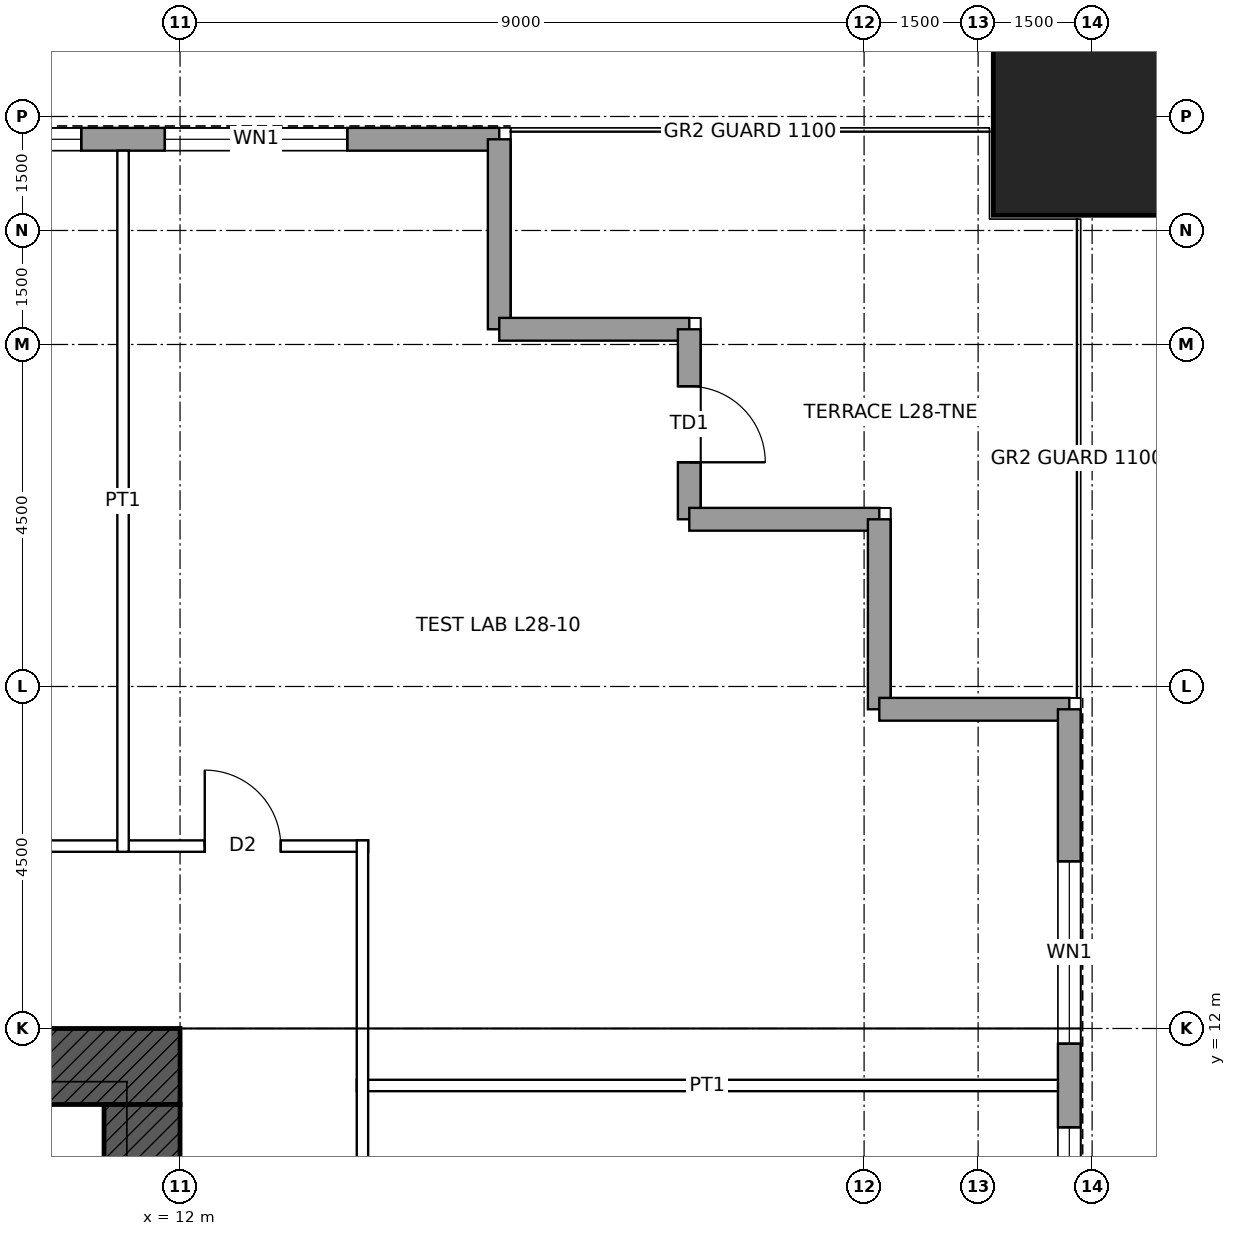
"""IFC4 building model, lengths in metres.
Left out: names, types, materials, properties, quantities, classifications, styles, units other than length and angle.
Written with IfcOpenShell. Run it as: python <this file> out.ifc"""

import sys

from ifc_helpers import new_model, si_unit, direction, frame, frame_2d, origin, origin_2d, place, context, subcontext, project, spatial, rectangle, hollow_rectangle, extrude, element, fill, save


model = new_model("IFC4")
c1 = context("Model", 3, precision=1e-05, world=origin(), true_north=direction((0.0, 1.0)))
c2 = subcontext(c1, "Body", "Model", "MODEL_VIEW")
j1 = project(units=[si_unit("LENGTHUNIT", "METRE"), si_unit("PLANEANGLEUNIT", "RADIAN")], contexts=[c1])
p1 = place(None, origin())
s1 = spatial("IfcSite", under=j1, at=p1, CompositionType="ELEMENT")
p2 = place(p1, origin())
s2 = spatial("IfcBuilding", under=s1, at=p2, CompositionType="ELEMENT")
p3 = place(p2, frame((0.0, 0.0, 140.4)))
s3 = spatial("IfcBuildingStorey", under=s2, at=p3, CompositionType="ELEMENT", Elevation=140.4)
p4 = place(p3, frame((24.0, 24.0, 0.0), z_axis=(0.0, 0.0, 1.0), x_axis=(1.0, 0.0, 0.0)))
e1 = element("IfcColumn", 1, at=p4, inside=s3, PredefinedType="COLUMN", context=c2, shape_type="SweptSolid", body=[
    extrude(hollow_rectangle(XDim=2.6, YDim=2.6, WallThickness=0.13, at=origin_2d()), origin(), (0.0, 0.0, 1.0), 4.5),
])
p5 = place(p3, frame((-12.0, 11.5, 0.0), z_axis=(0.0, 0.0, 1.0), x_axis=(1.0, 0.0, 0.0)))
e2 = element("IfcWall", 2, at=p5, inside=s3, PredefinedType="SHEAR", context=c2, shape_type="SweptSolid", body=[
    extrude(rectangle(XDim=24.0, YDim=1.0, at=frame_2d((12.0, 0.0))), origin(), (0.0, 0.0, 1.0), 4.5),
])
p6 = place(p5, frame((6.25, 0.0, 0.0)))
e3 = element("IfcOpeningElement", 3, at=p6, cuts=e2, PredefinedType="OPENING", context=c2, shape_type="SweptSolid", body=[
    extrude(rectangle(XDim=1.0, YDim=2.4, at=frame_2d((0.5, 1.2))), frame((0.0, 0.51, 0.0), z_axis=(0.0, -1.0, 0.0), x_axis=(1.0, 0.0, 0.0)), (0.0, 0.0, 1.0), 1.02),
])
p7 = place(p5, frame((16.75, 0.0, 0.0)))
e4 = element("IfcOpeningElement", 4, at=p7, cuts=e2, PredefinedType="OPENING", context=c2, shape_type="SweptSolid", body=[
    extrude(rectangle(XDim=1.0, YDim=2.4, at=frame_2d((0.5, 1.2))), frame((0.0, 0.51, 0.0), z_axis=(0.0, -1.0, 0.0), x_axis=(1.0, 0.0, 0.0)), (0.0, 0.0, 1.0), 1.02),
])
p8 = place(p3, frame((11.5, 11.0, 0.0), z_axis=(0.0, 0.0, 1.0), x_axis=(0.0, -1.0, 0.0)))
e5 = element("IfcWall", 5, at=p8, inside=s3, PredefinedType="SHEAR", context=c2, shape_type="SweptSolid", body=[
    extrude(rectangle(XDim=22.0, YDim=1.0, at=frame_2d((11.0, 0.0))), origin(), (0.0, 0.0, 1.0), 4.5),
])
p9 = place(p8, frame((10.5, 0.0, 0.0)))
e6 = element("IfcOpeningElement", 6, at=p9, cuts=e5, PredefinedType="OPENING", context=c2, shape_type="SweptSolid", body=[
    extrude(rectangle(XDim=1.0, YDim=2.4, at=frame_2d((0.5, 1.2))), frame((0.0, 0.51, 0.0), z_axis=(0.0, -1.0, 0.0), x_axis=(1.0, 0.0, 0.0)), (0.0, 0.0, 1.0), 1.02),
])
p10 = place(p3, frame((-16.2, 23.7, 0.0), z_axis=(0.0, 0.0, 1.0), x_axis=(1.0, 0.0, 0.0)))
e7 = element("IfcWall", 7, at=p10, inside=s3, PredefinedType="SOLIDWALL", context=c2, shape_type="SweptSolid", body=[
    extrude(rectangle(XDim=32.4, YDim=0.3, at=frame_2d((16.2, 0.0))), origin(), (0.0, 0.0, 1.0), 4.3),
])
p11 = place(p10, frame((2.0, 0.0, 1.0)))
e8 = element("IfcOpeningElement", 8, at=p11, cuts=e7, PredefinedType="OPENING", context=c2, shape_type="SweptSolid", body=[
    extrude(rectangle(XDim=2.4, YDim=1.2, at=frame_2d((1.2, 0.6))), frame((0.0, 0.16, 0.0), z_axis=(0.0, -1.0, 0.0), x_axis=(1.0, 0.0, 0.0)), (0.0, 0.0, 1.0), 0.32),
])
p12 = place(p10, frame((5.5, 0.0, 1.0)))
e9 = element("IfcOpeningElement", 9, at=p12, cuts=e7, PredefinedType="OPENING", context=c2, shape_type="SweptSolid", body=[
    extrude(rectangle(XDim=2.4, YDim=1.2, at=frame_2d((1.2, 0.6))), frame((0.0, 0.16, 0.0), z_axis=(0.0, -1.0, 0.0), x_axis=(1.0, 0.0, 0.0)), (0.0, 0.0, 1.0), 0.32),
])
p13 = place(p10, frame((9.5, 0.0, 1.0)))
e10 = element("IfcOpeningElement", 10, at=p13, cuts=e7, PredefinedType="OPENING", context=c2, shape_type="SweptSolid", body=[
    extrude(rectangle(XDim=2.4, YDim=1.2, at=frame_2d((1.2, 0.6))), frame((0.0, 0.16, 0.0), z_axis=(0.0, -1.0, 0.0), x_axis=(1.0, 0.0, 0.0)), (0.0, 0.0, 1.0), 0.32),
])
p14 = place(p10, frame((13.0, 0.0, 1.0)))
e11 = element("IfcOpeningElement", 11, at=p14, cuts=e7, PredefinedType="OPENING", context=c2, shape_type="SweptSolid", body=[
    extrude(rectangle(XDim=2.4, YDim=1.2, at=frame_2d((1.2, 0.6))), frame((0.0, 0.16, 0.0), z_axis=(0.0, -1.0, 0.0), x_axis=(1.0, 0.0, 0.0)), (0.0, 0.0, 1.0), 0.32),
])
p15 = place(p10, frame((17.0, 0.0, 1.0)))
e12 = element("IfcOpeningElement", 12, at=p15, cuts=e7, PredefinedType="OPENING", context=c2, shape_type="SweptSolid", body=[
    extrude(rectangle(XDim=2.4, YDim=1.2, at=frame_2d((1.2, 0.6))), frame((0.0, 0.16, 0.0), z_axis=(0.0, -1.0, 0.0), x_axis=(1.0, 0.0, 0.0)), (0.0, 0.0, 1.0), 0.32),
])
p16 = place(p10, frame((20.5, 0.0, 1.0)))
e13 = element("IfcOpeningElement", 13, at=p16, cuts=e7, PredefinedType="OPENING", context=c2, shape_type="SweptSolid", body=[
    extrude(rectangle(XDim=2.4, YDim=1.2, at=frame_2d((1.2, 0.6))), frame((0.0, 0.16, 0.0), z_axis=(0.0, -1.0, 0.0), x_axis=(1.0, 0.0, 0.0)), (0.0, 0.0, 1.0), 0.32),
])
p17 = place(p10, frame((24.5, 0.0, 1.0)))
e14 = element("IfcOpeningElement", 14, at=p17, cuts=e7, PredefinedType="OPENING", context=c2, shape_type="SweptSolid", body=[
    extrude(rectangle(XDim=2.4, YDim=1.2, at=frame_2d((1.2, 0.6))), frame((0.0, 0.16, 0.0), z_axis=(0.0, -1.0, 0.0), x_axis=(1.0, 0.0, 0.0)), (0.0, 0.0, 1.0), 0.32),
])
p18 = place(p10, frame((28.0, 0.0, 1.0)))
e15 = element("IfcOpeningElement", 15, at=p18, cuts=e7, PredefinedType="OPENING", context=c2, shape_type="SweptSolid", body=[
    extrude(rectangle(XDim=2.4, YDim=1.2, at=frame_2d((1.2, 0.6))), frame((0.0, 0.16, 0.0), z_axis=(0.0, -1.0, 0.0), x_axis=(1.0, 0.0, 0.0)), (0.0, 0.0, 1.0), 0.32),
])
for number, where, z_axis, x_axis in (
    (16, (16.2, 23.7, 0.0), (0.0, 0.0, 1.0), (0.0, -1.0, 0.0)),
    (17, (16.2, 21.2, 0.0), (0.0, 0.0, 1.0), (1.0, 0.0, 0.0)),
):
    element("IfcWall", number, at=place(p3, frame(where, z_axis=z_axis, x_axis=x_axis)), inside=s3, PredefinedType="SOLIDWALL", context=c2, shape_type="SweptSolid", body=[
        extrude(rectangle(XDim=2.5, YDim=0.3, at=frame_2d((1.25, 0.0))), origin(), (0.0, 0.0, 1.0), 4.3),
    ])
p19 = place(p3, frame((18.7, 21.2, 0.0), z_axis=(0.0, 0.0, 1.0), x_axis=(0.0, -1.0, 0.0)))
e18 = element("IfcWall", 18, at=p19, inside=s3, PredefinedType="SOLIDWALL", context=c2, shape_type="SweptSolid", body=[
    extrude(rectangle(XDim=2.5, YDim=0.3, at=frame_2d((1.25, 0.0))), origin(), (0.0, 0.0, 1.0), 4.3),
])
p20 = place(p19, frame((0.75, 0.0, 0.0)))
e19 = element("IfcOpeningElement", 19, at=p20, cuts=e18, PredefinedType="OPENING", context=c2, shape_type="SweptSolid", body=[
    extrude(rectangle(XDim=1.0, YDim=2.4, at=frame_2d((0.5, 1.2))), frame((0.0, 0.16, 0.0), z_axis=(0.0, -1.0, 0.0), x_axis=(1.0, 0.0, 0.0)), (0.0, 0.0, 1.0), 0.32),
])
for number, where, z_axis, x_axis in (
    (20, (18.7, 18.7, 0.0), (0.0, 0.0, 1.0), (1.0, 0.0, 0.0)),
    (21, (21.2, 18.7, 0.0), (0.0, 0.0, 1.0), (0.0, -1.0, 0.0)),
    (22, (21.2, 16.2, 0.0), (0.0, 0.0, 1.0), (1.0, 0.0, 0.0)),
):
    element("IfcWall", number, at=place(p3, frame(where, z_axis=z_axis, x_axis=x_axis)), inside=s3, PredefinedType="SOLIDWALL", context=c2, shape_type="SweptSolid", body=[
        extrude(rectangle(XDim=2.5, YDim=0.3, at=frame_2d((1.25, 0.0))), origin(), (0.0, 0.0, 1.0), 4.3),
    ])
p21 = place(p3, frame((23.7, 16.2, 0.0), z_axis=(0.0, 0.0, 1.0), x_axis=(0.0, -1.0, 0.0)))
e23 = element("IfcWall", 23, at=p21, inside=s3, PredefinedType="SOLIDWALL", context=c2, shape_type="SweptSolid", body=[
    extrude(rectangle(XDim=32.4, YDim=0.3, at=frame_2d((16.2, 0.0))), origin(), (0.0, 0.0, 1.0), 4.3),
])
p22 = place(p21, frame((2.0, 0.0, 1.0)))
e24 = element("IfcOpeningElement", 24, at=p22, cuts=e23, PredefinedType="OPENING", context=c2, shape_type="SweptSolid", body=[
    extrude(rectangle(XDim=2.4, YDim=1.2, at=frame_2d((1.2, 0.6))), frame((0.0, 0.16, 0.0), z_axis=(0.0, -1.0, 0.0), x_axis=(1.0, 0.0, 0.0)), (0.0, 0.0, 1.0), 0.32),
])
p23 = place(p21, frame((5.5, 0.0, 1.0)))
e25 = element("IfcOpeningElement", 25, at=p23, cuts=e23, PredefinedType="OPENING", context=c2, shape_type="SweptSolid", body=[
    extrude(rectangle(XDim=2.4, YDim=1.2, at=frame_2d((1.2, 0.6))), frame((0.0, 0.16, 0.0), z_axis=(0.0, -1.0, 0.0), x_axis=(1.0, 0.0, 0.0)), (0.0, 0.0, 1.0), 0.32),
])
p24 = place(p21, frame((9.5, 0.0, 1.0)))
e26 = element("IfcOpeningElement", 26, at=p24, cuts=e23, PredefinedType="OPENING", context=c2, shape_type="SweptSolid", body=[
    extrude(rectangle(XDim=2.4, YDim=1.2, at=frame_2d((1.2, 0.6))), frame((0.0, 0.16, 0.0), z_axis=(0.0, -1.0, 0.0), x_axis=(1.0, 0.0, 0.0)), (0.0, 0.0, 1.0), 0.32),
])
p25 = place(p21, frame((13.0, 0.0, 1.0)))
e27 = element("IfcOpeningElement", 27, at=p25, cuts=e23, PredefinedType="OPENING", context=c2, shape_type="SweptSolid", body=[
    extrude(rectangle(XDim=2.4, YDim=1.2, at=frame_2d((1.2, 0.6))), frame((0.0, 0.16, 0.0), z_axis=(0.0, -1.0, 0.0), x_axis=(1.0, 0.0, 0.0)), (0.0, 0.0, 1.0), 0.32),
])
p26 = place(p21, frame((17.0, 0.0, 1.0)))
e28 = element("IfcOpeningElement", 28, at=p26, cuts=e23, PredefinedType="OPENING", context=c2, shape_type="SweptSolid", body=[
    extrude(rectangle(XDim=2.4, YDim=1.2, at=frame_2d((1.2, 0.6))), frame((0.0, 0.16, 0.0), z_axis=(0.0, -1.0, 0.0), x_axis=(1.0, 0.0, 0.0)), (0.0, 0.0, 1.0), 0.32),
])
p27 = place(p21, frame((20.5, 0.0, 1.0)))
e29 = element("IfcOpeningElement", 29, at=p27, cuts=e23, PredefinedType="OPENING", context=c2, shape_type="SweptSolid", body=[
    extrude(rectangle(XDim=2.4, YDim=1.2, at=frame_2d((1.2, 0.6))), frame((0.0, 0.16, 0.0), z_axis=(0.0, -1.0, 0.0), x_axis=(1.0, 0.0, 0.0)), (0.0, 0.0, 1.0), 0.32),
])
p28 = place(p21, frame((24.5, 0.0, 1.0)))
e30 = element("IfcOpeningElement", 30, at=p28, cuts=e23, PredefinedType="OPENING", context=c2, shape_type="SweptSolid", body=[
    extrude(rectangle(XDim=2.4, YDim=1.2, at=frame_2d((1.2, 0.6))), frame((0.0, 0.16, 0.0), z_axis=(0.0, -1.0, 0.0), x_axis=(1.0, 0.0, 0.0)), (0.0, 0.0, 1.0), 0.32),
])
p29 = place(p21, frame((28.0, 0.0, 1.0)))
e31 = element("IfcOpeningElement", 31, at=p29, cuts=e23, PredefinedType="OPENING", context=c2, shape_type="SweptSolid", body=[
    extrude(rectangle(XDim=2.4, YDim=1.2, at=frame_2d((1.2, 0.6))), frame((0.0, 0.16, 0.0), z_axis=(0.0, -1.0, 0.0), x_axis=(1.0, 0.0, 0.0)), (0.0, 0.0, 1.0), 0.32),
])
p30 = place(p3, frame((14.325, 11.25, 0.0), z_axis=(0.0, 0.0, 1.0), x_axis=(1.0, 0.0, 0.0)))
e32 = element("IfcWall", 32, at=p30, inside=s3, PredefinedType="PARTITIONING", context=c2, shape_type="SweptSolid", body=[
    extrude(rectangle(XDim=9.225, YDim=0.15, at=frame_2d((4.613, 0.0))), origin(), (0.0, 0.0, 1.0), 3.431),
])
p31 = place(p3, frame((-14.475, 14.4, 0.0), z_axis=(0.0, 0.0, 1.0), x_axis=(1.0, 0.0, 0.0)))
e33 = element("IfcWall", 33, at=p31, inside=s3, PredefinedType="PARTITIONING", context=c2, shape_type="SweptSolid", body=[
    extrude(rectangle(XDim=28.95, YDim=0.15, at=frame_2d((14.475, 0.0))), origin(), (0.0, 0.0, 1.0), 4.3),
])
p32 = place(p31, frame((13.575, 0.0, 0.0)))
e34 = element("IfcOpeningElement", 34, at=p32, cuts=e33, PredefinedType="OPENING", context=c2, shape_type="SweptSolid", body=[
    extrude(rectangle(XDim=1.8, YDim=2.4, at=frame_2d((0.9, 1.2))), frame((0.0, 0.085, 0.0), z_axis=(0.0, -1.0, 0.0), x_axis=(1.0, 0.0, 0.0)), (0.0, 0.0, 1.0), 0.17),
])
p33 = place(p31, frame((26.8, 0.0, 0.0)))
e35 = element("IfcOpeningElement", 35, at=p33, cuts=e33, PredefinedType="OPENING", context=c2, shape_type="SweptSolid", body=[
    extrude(rectangle(XDim=1.0, YDim=2.1, at=frame_2d((0.5, 1.05))), frame((0.0, 0.085, 0.0), z_axis=(0.0, -1.0, 0.0), x_axis=(1.0, 0.0, 0.0)), (0.0, 0.0, 1.0), 0.17),
])
p34 = place(p31, frame((1.15, 0.0, 0.0)))
e36 = element("IfcOpeningElement", 36, at=p34, cuts=e33, PredefinedType="OPENING", context=c2, shape_type="SweptSolid", body=[
    extrude(rectangle(XDim=1.0, YDim=2.1, at=frame_2d((0.5, 1.05))), frame((0.0, 0.085, 0.0), z_axis=(0.0, -1.0, 0.0), x_axis=(1.0, 0.0, 0.0)), (0.0, 0.0, 1.0), 0.17),
])
p35 = place(p3, frame((11.25, 14.325, 0.0), z_axis=(0.0, 0.0, 1.0), x_axis=(0.0, 1.0, 0.0)))
e37 = element("IfcWall", 37, at=p35, inside=s3, PredefinedType="PARTITIONING", context=c2, shape_type="SweptSolid", body=[
    extrude(rectangle(XDim=9.225, YDim=0.15, at=frame_2d((4.613, 0.0))), origin(), (0.0, 0.0, 1.0), 3.431),
])
p36 = place(p3, frame((14.4, -14.475, 0.0), z_axis=(0.0, 0.0, 1.0), x_axis=(0.0, 1.0, 0.0)))
e38 = element("IfcWall", 38, at=p36, inside=s3, PredefinedType="PARTITIONING", context=c2, shape_type="SweptSolid", body=[
    extrude(rectangle(XDim=28.95, YDim=0.15, at=frame_2d((14.475, 0.0))), origin(), (0.0, 0.0, 1.0), 4.3),
])
p37 = place(p36, frame((17.325, 0.0, 0.0)))
e39 = element("IfcOpeningElement", 39, at=p37, cuts=e38, PredefinedType="OPENING", context=c2, shape_type="SweptSolid", body=[
    extrude(rectangle(XDim=1.8, YDim=2.4, at=frame_2d((0.9, 1.2))), frame((0.0, 0.085, 0.0), z_axis=(0.0, -1.0, 0.0), x_axis=(1.0, 0.0, 0.0)), (0.0, 0.0, 1.0), 0.17),
])
p38 = place(p36, frame((6.075, 0.0, 0.0)))
e40 = element("IfcOpeningElement", 40, at=p38, cuts=e38, PredefinedType="OPENING", context=c2, shape_type="SweptSolid", body=[
    extrude(rectangle(XDim=1.8, YDim=2.4, at=frame_2d((0.9, 1.2))), frame((0.0, 0.085, 0.0), z_axis=(0.0, -1.0, 0.0), x_axis=(1.0, 0.0, 0.0)), (0.0, 0.0, 1.0), 0.17),
])
p39 = place(p17, origin())
e41 = element("IfcWindow", 41, at=p39, inside=s3, PartitioningType="SINGLE_PANEL", PredefinedType="WINDOW", context=c2, shape_type="SweptSolid", body=[
    extrude(rectangle(XDim=2.4, YDim=1.2, at=frame_2d((1.2, 0.6))), frame((0.0, 0.03, 0.0), z_axis=(0.0, -1.0, 0.0), x_axis=(1.0, 0.0, 0.0)), (0.0, 0.0, 1.0), 0.06),
])
fill(e14, e41)
p40 = place(p18, origin())
e42 = element("IfcWindow", 42, at=p40, inside=s3, PartitioningType="SINGLE_PANEL", PredefinedType="WINDOW", context=c2, shape_type="SweptSolid", body=[
    extrude(rectangle(XDim=2.4, YDim=1.2, at=frame_2d((1.2, 0.6))), frame((0.0, 0.03, 0.0), z_axis=(0.0, -1.0, 0.0), x_axis=(1.0, 0.0, 0.0)), (0.0, 0.0, 1.0), 0.06),
])
fill(e15, e42)
p41 = place(p20, origin())
e43 = element("IfcDoor", 43, at=p41, inside=s3, OperationType="SINGLE_SWING_RIGHT", PredefinedType="DOOR", context=c2, shape_type="SweptSolid", body=[
    extrude(rectangle(XDim=1.0, YDim=2.4, at=frame_2d((0.5, 1.2))), frame((0.0, 0.025, 0.0), z_axis=(0.0, -1.0, 0.0), x_axis=(1.0, 0.0, 0.0)), (0.0, 0.0, 1.0), 0.05),
])
fill(e19, e43)
p42 = place(p22, origin())
e44 = element("IfcWindow", 44, at=p42, inside=s3, PartitioningType="SINGLE_PANEL", PredefinedType="WINDOW", context=c2, shape_type="SweptSolid", body=[
    extrude(rectangle(XDim=2.4, YDim=1.2, at=frame_2d((1.2, 0.6))), frame((0.0, 0.03, 0.0), z_axis=(0.0, -1.0, 0.0), x_axis=(1.0, 0.0, 0.0)), (0.0, 0.0, 1.0), 0.06),
])
fill(e24, e44)
p43 = place(p23, origin())
e45 = element("IfcWindow", 45, at=p43, inside=s3, PartitioningType="SINGLE_PANEL", PredefinedType="WINDOW", context=c2, shape_type="SweptSolid", body=[
    extrude(rectangle(XDim=2.4, YDim=1.2, at=frame_2d((1.2, 0.6))), frame((0.0, 0.03, 0.0), z_axis=(0.0, -1.0, 0.0), x_axis=(1.0, 0.0, 0.0)), (0.0, 0.0, 1.0), 0.06),
])
fill(e25, e45)
p44 = place(p33, origin())
e46 = element("IfcDoor", 46, at=p44, inside=s3, OperationType="SINGLE_SWING_LEFT", PredefinedType="DOOR", context=c2, shape_type="SweptSolid", body=[
    extrude(rectangle(XDim=1.0, YDim=2.1, at=frame_2d((0.5, 1.05))), frame((0.0, 0.025, 0.0), z_axis=(0.0, -1.0, 0.0), x_axis=(1.0, 0.0, 0.0)), (0.0, 0.0, 1.0), 0.05),
])
fill(e35, e46)
save(model, sys.argv[1])
